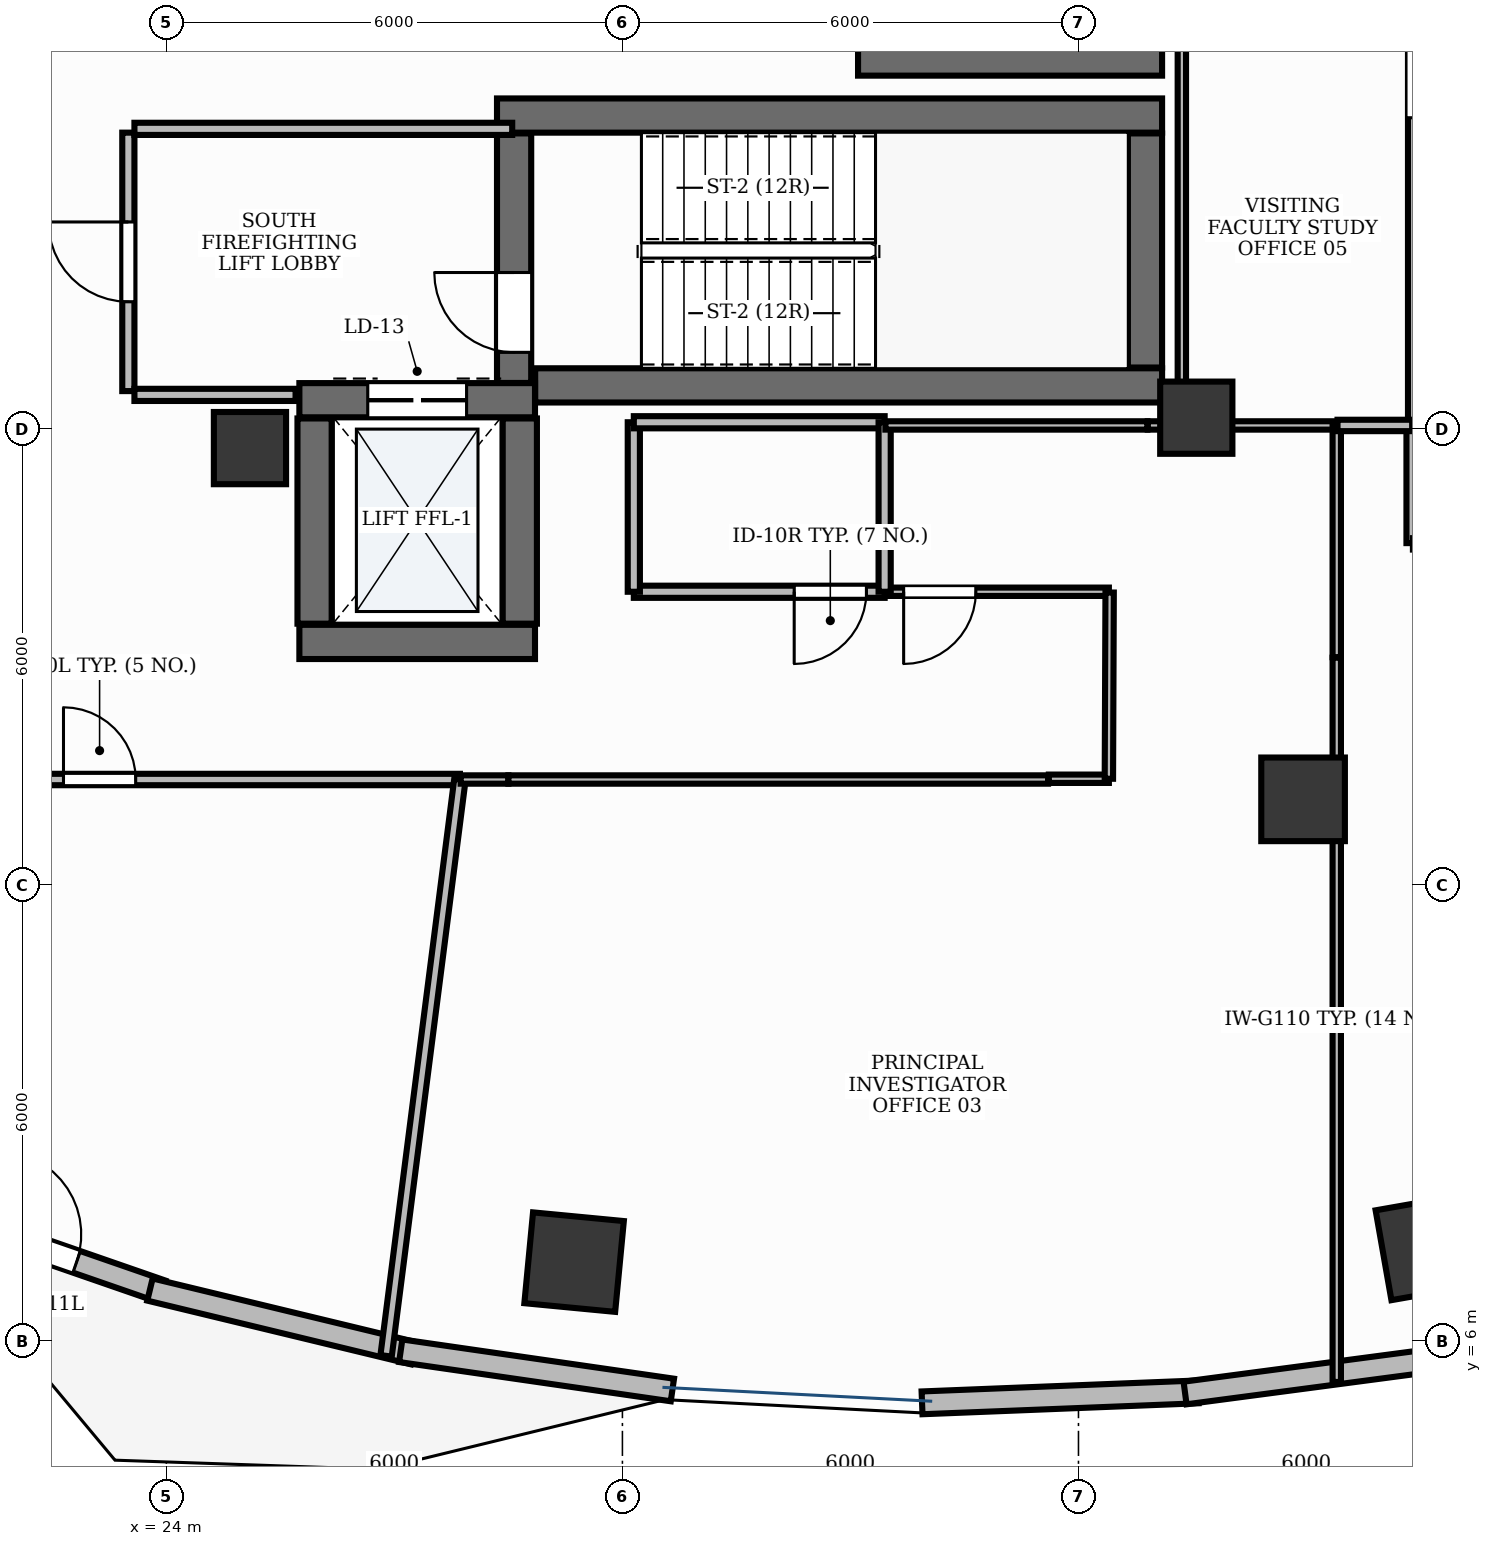
"""IFC4 building model, lengths in metres.
Left out: names, types, materials, properties, quantities, classifications, styles, units other than length and angle.
Written with IfcOpenShell. Run it as: python <this file> out.ifc"""

import sys

from ifc_helpers import new_model, si_unit, direction, frame, frame_2d, origin, origin_2d, place, context, subcontext, project, spatial, rectangle, extrude, element, fill, save


model = new_model("IFC4")
c1 = context("Model", 3, precision=1e-05, world=origin(), true_north=direction((0.0, 1.0)))
c2 = subcontext(c1, "Body", "Model", "MODEL_VIEW")
j1 = project(units=[si_unit("LENGTHUNIT", "METRE"), si_unit("PLANEANGLEUNIT", "RADIAN")], contexts=[c1])
p1 = place(None, origin())
s1 = spatial("IfcSite", under=j1, at=p1, CompositionType="ELEMENT")
p2 = place(p1, origin())
s2 = spatial("IfcBuilding", under=s1, at=p2, CompositionType="ELEMENT")
p3 = place(p2, frame((0.0, 0.0, 127.8)))
s3 = spatial("IfcBuildingStorey", under=s2, at=p3, CompositionType="ELEMENT", Elevation=127.8)
p4 = place(p3, frame((28.852, 18.575, 0.0), z_axis=(0.0, 0.0, 1.0), x_axis=(1.0, 0.0, 0.0)))
e1 = element("IfcWall", 1, at=p4, inside=s3, PredefinedType="SHEAR", context=c2, shape_type="SweptSolid", body=[
    extrude(rectangle(XDim=8.248, YDim=0.45, at=frame_2d((4.124, 0.0))), origin(), (0.0, 0.0, 1.0), 3.9),
])
p5 = place(p3, frame((28.35, 22.125, 0.0), z_axis=(0.0, 0.0, 1.0), x_axis=(1.0, 0.0, 0.0)))
e2 = element("IfcWall", 2, at=p5, inside=s3, PredefinedType="SHEAR", context=c2, shape_type="SweptSolid", body=[
    extrude(rectangle(XDim=8.75, YDim=0.45, at=frame_2d((4.375, 0.0))), origin(), (0.0, 0.0, 1.0), 3.9),
])
p6 = place(p3, frame((36.875, 18.81, 0.0), z_axis=(0.0, 0.0, 1.0), x_axis=(0.0, 1.0, 0.0)))
e3 = element("IfcWall", 3, at=p6, inside=s3, PredefinedType="SHEAR", context=c2, shape_type="SweptSolid", body=[
    extrude(rectangle(XDim=3.08, YDim=0.45, at=frame_2d((1.54, 0.0))), origin(), (0.0, 0.0, 1.0), 3.9),
])
p7 = place(p3, frame((28.575, 18.607, 0.0), z_axis=(0.0, 0.0, 1.0), x_axis=(0.0, 1.0, 0.0)))
e4 = element("IfcWall", 4, at=p7, inside=s3, PredefinedType="SHEAR", context=c2, shape_type="SweptSolid", body=[
    extrude(rectangle(XDim=3.283, YDim=0.45, at=frame_2d((1.642, 0.0))), origin(), (0.0, 0.0, 1.0), 3.9),
])
p8 = place(p7, frame((0.403, 0.0, 0.0)))
e5 = element("IfcOpeningElement", 5, at=p8, cuts=e4, PredefinedType="OPENING", context=c2, shape_type="SweptSolid", body=[
    extrude(rectangle(XDim=1.05, YDim=2.15, at=frame_2d((0.525, 1.075))), frame((0.0, 0.24, 0.0), z_axis=(0.0, -1.0, 0.0), x_axis=(1.0, 0.0, 0.0)), (0.0, 0.0, 1.0), 0.48),
])
p9 = place(p3, frame((33.1, 22.875, 0.0), z_axis=(0.0, 0.0, 1.0), x_axis=(1.0, 0.0, 0.0)))
e6 = element("IfcWall", 6, at=p9, inside=s3, PredefinedType="SHEAR", context=c2, shape_type="SweptSolid", body=[
    extrude(rectangle(XDim=4.0, YDim=0.45, at=frame_2d((2.0, 0.0))), origin(), (0.0, 0.0, 1.0), 3.9),
])
p10 = place(p3, frame((25.75, 15.2, 0.0), z_axis=(0.0, 0.0, 1.0), x_axis=(1.0, 0.0, 0.0)))
e7 = element("IfcWall", 7, at=p10, inside=s3, PredefinedType="SHEAR", context=c2, shape_type="SweptSolid", body=[
    extrude(rectangle(XDim=3.1, YDim=0.45, at=frame_2d((1.55, 0.0))), origin(), (0.0, 0.0, 1.0), 3.9),
])
p11 = place(p3, frame((25.75, 18.38, 0.0), z_axis=(0.0, 0.0, 1.0), x_axis=(1.0, 0.0, 0.0)))
e8 = element("IfcWall", 8, at=p11, inside=s3, PredefinedType="SHEAR", context=c2, shape_type="SweptSolid", body=[
    extrude(rectangle(XDim=3.1, YDim=0.45, at=frame_2d((1.55, 0.0))), origin(), (0.0, 0.0, 1.0), 3.9),
])
p12 = place(p11, frame((0.9, 0.0, 0.0)))
e9 = element("IfcOpeningElement", 9, at=p12, cuts=e8, PredefinedType="OPENING", context=c2, shape_type="SweptSolid", body=[
    extrude(rectangle(XDim=1.3, YDim=2.2, at=frame_2d((0.65, 1.1))), frame((0.0, 0.24, 0.0), z_axis=(0.0, -1.0, 0.0), x_axis=(1.0, 0.0, 0.0)), (0.0, 0.0, 1.0), 0.48),
])
for number, where, z_axis, x_axis in (
    (10, (25.95, 15.44, 0.0), (0.0, 0.0, 1.0), (0.0, 1.0, 0.0)),
    (11, (28.65, 15.44, 0.0), (0.0, 0.0, 1.0), (0.0, 1.0, 0.0)),
):
    element("IfcWall", number, at=place(p3, frame(where, z_axis=z_axis, x_axis=x_axis)), inside=s3, PredefinedType="SHEAR", context=c2, shape_type="SweptSolid", body=[
        extrude(rectangle(XDim=2.7, YDim=0.45, at=frame_2d((1.35, 0.0))), origin(), (0.0, 0.0, 1.0), 3.9),
    ])
for number, where, z_axis, x_axis in (
    (12, (25.1, 17.75, -0.0), (0.0, 0.0, 1.0), (1.0, 0.0, 0.0)),
    (13, (37.55, 18.15, -0.0), (0.0, 0.0, 1.0), (1.0, 0.0, 0.0)),
):
    element("IfcColumn", number, at=place(p3, frame(where, z_axis=z_axis, x_axis=x_axis)), inside=s3, PredefinedType="PILASTER", context=c2, shape_type="SweptSolid", body=[
        extrude(rectangle(XDim=0.95, YDim=0.95, at=origin_2d()), origin(), (0.0, 0.0, 1.0), 3.901),
    ])
for number, where, z_axis, x_axis in (
    (14, (29.364, 7.041, -0.0), (0.0, 0.0, 1.0), (-0.995, 0.095, 0.0)),
    (15, (40.604, 7.235, -0.0), (0.0, 0.0, 1.0), (0.985, 0.173, 0.0)),
):
    element("IfcColumn", number, at=place(p3, frame(where, z_axis=z_axis, x_axis=x_axis)), inside=s3, PredefinedType="COLUMN", context=c2, shape_type="SweptSolid", body=[
        extrude(rectangle(XDim=1.2, YDim=1.2, at=origin_2d()), origin(), (0.0, 0.0, 1.0), 3.901),
    ])
p13 = place(p3, frame((38.955, 13.129, -0.0), z_axis=(0.0, 0.0, 1.0), x_axis=(1.0, 0.0, 0.0)))
e16 = element("IfcColumn", 16, at=p13, inside=s3, PredefinedType="COLUMN", context=c2, shape_type="SweptSolid", body=[
    extrude(rectangle(XDim=1.1, YDim=1.1, at=origin_2d()), origin(), (0.0, 0.0, 1.0), 3.901),
])
p14 = place(p3, frame((20.662, 7.792, 0.0), z_axis=(0.0, 0.0, 1.0), x_axis=(0.944878029854, -0.3274225232, 0.0)))
e17 = element("IfcWall", 17, at=p14, inside=s3, PredefinedType="STANDARD", context=c2, shape_type="SweptSolid", body=[
    extrude(rectangle(XDim=3.467, YDim=0.3, at=frame_2d((1.734, 0.0))), origin(), (0.0, 0.0, 1.0), 3.9),
])
p15 = place(p14, frame((1.184, 0.0, 0.0)))
e18 = element("IfcOpeningElement", 18, at=p15, cuts=e17, PredefinedType="OPENING", context=c2, shape_type="SweptSolid", body=[
    extrude(rectangle(XDim=1.1, YDim=2.15, at=frame_2d((0.55, 1.075))), frame((0.0, 0.165, 0.0), z_axis=(0.0, -1.0, 0.0), x_axis=(1.0, 0.0, 0.0)), (0.0, 0.0, 1.0), 0.33),
])
p16 = place(p3, frame((23.784, 6.68, 0.0), z_axis=(0.0, 0.0, 1.0), x_axis=(0.972043452321, -0.234801036625, 0.0)))
e19 = element("IfcWall", 19, at=p16, inside=s3, PredefinedType="STANDARD", context=c2, shape_type="SweptSolid", body=[
    extrude(rectangle(XDim=3.569, YDim=0.3, at=frame_2d((1.784, 0.0))), origin(), (0.0, 0.0, 1.0), 3.9),
])
p17 = place(p3, frame((27.083, 5.875, 0.0), z_axis=(0.0, 0.0, 1.0), x_axis=(0.989734732902, -0.142916613754, 0.0)))
e20 = element("IfcWall", 20, at=p17, inside=s3, PredefinedType="STANDARD", context=c2, shape_type="SweptSolid", body=[
    extrude(rectangle(XDim=3.611, YDim=0.3, at=frame_2d((1.806, 0.0))), origin(), (0.0, 0.0, 1.0), 3.9),
])
p18 = place(p3, frame((33.942, 5.189, 0.0), z_axis=(0.0, 0.0, 1.0), x_axis=(0.999212076676, 0.039689114679, 0.0)))
e21 = element("IfcWall", 21, at=p18, inside=s3, PredefinedType="STANDARD", context=c2, shape_type="SweptSolid", body=[
    extrude(rectangle(XDim=3.635, YDim=0.3, at=frame_2d((1.818, 0.0))), origin(), (0.0, 0.0, 1.0), 3.9),
])
p19 = place(p3, frame((37.402, 5.319, 0.0), z_axis=(0.0, 0.0, 1.0), x_axis=(0.991372969521, 0.131071107816, 0.0)))
e22 = element("IfcWall", 22, at=p19, inside=s3, PredefinedType="STANDARD", context=c2, shape_type="SweptSolid", body=[
    extrude(rectangle(XDim=3.615, YDim=0.3, at=frame_2d((1.808, 0.0))), origin(), (0.0, 0.0, 1.0), 3.9),
])
p20 = place(p3, frame((23.5, 18.5, 0.0), z_axis=(0.0, 0.0, 1.0), x_axis=(0.0, 1.0, 0.0)))
e23 = element("IfcWall", 23, at=p20, inside=s3, PredefinedType="PARTITIONING", context=c2, shape_type="SweptSolid", body=[
    extrude(rectangle(XDim=3.4, YDim=0.16, at=frame_2d((1.7, 0.0))), origin(), (0.0, 0.0, 1.0), 2.91),
])
p21 = place(p20, frame((1.175, 0.0, 0.0)))
e24 = element("IfcOpeningElement", 24, at=p21, cuts=e23, PredefinedType="OPENING", context=c2, shape_type="SweptSolid", body=[
    extrude(rectangle(XDim=1.05, YDim=2.15, at=frame_2d((0.525, 1.075))), frame((0.0, 0.095, 0.0), z_axis=(0.0, -1.0, 0.0), x_axis=(1.0, 0.0, 0.0)), (0.0, 0.0, 1.0), 0.19),
])
p22 = place(p3, frame((23.58, 21.95, 0.0), z_axis=(0.0, 0.0, 1.0), x_axis=(1.0, 0.0, 0.0)))
e25 = element("IfcWall", 25, at=p22, inside=s3, PredefinedType="PARTITIONING", context=c2, shape_type="SweptSolid", body=[
    extrude(rectangle(XDim=4.97, YDim=0.16, at=frame_2d((2.485, 0.0))), origin(), (0.0, 0.0, 1.0), 2.91),
])
p23 = place(p3, frame((23.58, 18.45, 0.0), z_axis=(0.0, 0.0, 1.0), x_axis=(1.0, 0.0, 0.0)))
e26 = element("IfcWall", 26, at=p23, inside=s3, PredefinedType="PARTITIONING", context=c2, shape_type="SweptSolid", body=[
    extrude(rectangle(XDim=2.12, YDim=0.16, at=frame_2d((1.06, 0.0))), origin(), (0.0, 0.0, 1.0), 2.91),
])
p24 = place(p3, frame((33.45, 15.86, 0.0), z_axis=(0.0, 0.0, 1.0), x_axis=(-1.0, 0.0, 0.0)))
e27 = element("IfcWall", 27, at=p24, inside=s3, PredefinedType="PARTITIONING", context=c2, shape_type="SweptSolid", body=[
    extrude(rectangle(XDim=3.3, YDim=0.16, at=frame_2d((1.65, 0.0))), origin(), (0.0, 0.0, 1.0), 2.91),
])
p25 = place(p24, frame((0.24, 0.0, 0.0)))
e28 = element("IfcOpeningElement", 28, at=p25, cuts=e27, PredefinedType="OPENING", context=c2, shape_type="SweptSolid", body=[
    extrude(rectangle(XDim=0.95, YDim=2.15, at=frame_2d((0.475, 1.075))), frame((0.0, 0.095, 0.0), z_axis=(0.0, -1.0, 0.0), x_axis=(1.0, 0.0, 0.0)), (0.0, 0.0, 1.0), 0.19),
])
p26 = place(p3, frame((21.8, 13.39, 0.0), z_axis=(0.0, 0.0, 1.0), x_axis=(1.0, 0.0, 0.0)))
e29 = element("IfcWall", 29, at=p26, inside=s3, PredefinedType="PARTITIONING", context=c2, shape_type="SweptSolid", body=[
    extrude(rectangle(XDim=6.062, YDim=0.15, at=frame_2d((3.031, 0.0))), origin(), (0.0, 0.0, 1.0), 2.91),
])
p27 = place(p26, frame((0.847, 0.0, 0.0)))
e30 = element("IfcOpeningElement", 30, at=p27, cuts=e29, PredefinedType="OPENING", context=c2, shape_type="SweptSolid", body=[
    extrude(rectangle(XDim=0.95, YDim=2.15, at=frame_2d((0.475, 1.075))), frame((0.0, 0.09, 0.0), z_axis=(0.0, -1.0, 0.0), x_axis=(1.0, 0.0, 0.0)), (0.0, 0.0, 1.0), 0.18),
])
p28 = place(p3, frame((36.4, 15.86, 0.0), z_axis=(0.0, 0.0, 1.0), x_axis=(-1.0, 0.0, 0.0)))
e31 = element("IfcWall", 31, at=p28, inside=s3, PredefinedType="MOVABLE", context=c2, shape_type="SweptSolid", body=[
    extrude(rectangle(XDim=2.94, YDim=0.11, at=frame_2d((1.47, 0.0))), origin(), (0.0, 0.0, 1.0), 2.91),
])
p29 = place(p28, frame((1.75, 0.0, 0.0)))
e32 = element("IfcOpeningElement", 32, at=p29, cuts=e31, PredefinedType="OPENING", context=c2, shape_type="SweptSolid", body=[
    extrude(rectangle(XDim=0.95, YDim=2.15, at=frame_2d((0.475, 1.075))), frame((0.0, 0.07, 0.0), z_axis=(0.0, -1.0, 0.0), x_axis=(1.0, 0.0, 0.0)), (0.0, 0.0, 1.0), 0.14),
])
p30 = place(p3, frame((40.39, 23.285, 0.0), z_axis=(0.0, 0.0, 1.0), x_axis=(0.0, -1.0, 0.0)))
e33 = element("IfcWall", 33, at=p30, inside=s3, PredefinedType="MOVABLE", context=c2, shape_type="SweptSolid", body=[
    extrude(rectangle(XDim=5.227, YDim=0.11, at=frame_2d((2.614, 0.0))), origin(), (0.0, 0.0, 1.0), 2.91),
])
p31 = place(p30, frame((0.24, 0.0, 0.0)))
e34 = element("IfcOpeningElement", 34, at=p31, cuts=e33, PredefinedType="OPENING", context=c2, shape_type="SweptSolid", body=[
    extrude(rectangle(XDim=0.95, YDim=2.15, at=frame_2d((0.475, 1.075))), frame((0.0, 0.07, 0.0), z_axis=(0.0, -1.0, 0.0), x_axis=(1.0, 0.0, 0.0)), (0.0, 0.0, 1.0), 0.14),
])
p32 = place(p3, frame((30.15, 15.86, 0.0), z_axis=(0.0, 0.0, 1.0), x_axis=(0.0, 1.0, 0.0)))
e35 = element("IfcWall", 35, at=p32, inside=s3, PredefinedType="PARTITIONING", context=c2, shape_type="SweptSolid", body=[
    extrude(rectangle(XDim=2.23, YDim=0.16, at=frame_2d((1.115, 0.0))), origin(), (0.0, 0.0, 1.0), 2.91),
])
p33 = place(p3, frame((30.15, 18.09, 0.0), z_axis=(0.0, 0.0, 1.0), x_axis=(1.0, 0.0, 0.0)))
e36 = element("IfcWall", 36, at=p33, inside=s3, PredefinedType="PARTITIONING", context=c2, shape_type="SweptSolid", body=[
    extrude(rectangle(XDim=3.3, YDim=0.16, at=frame_2d((1.65, 0.0))), origin(), (0.0, 0.0, 1.0), 2.91),
])
p34 = place(p3, frame((33.45, 18.09, 0.0), z_axis=(0.0, 0.0, 1.0), x_axis=(0.0, -1.0, 0.0)))
e37 = element("IfcWall", 37, at=p34, inside=s3, PredefinedType="PARTITIONING", context=c2, shape_type="SweptSolid", body=[
    extrude(rectangle(XDim=2.23, YDim=0.16, at=frame_2d((1.115, 0.0))), origin(), (0.0, 0.0, 1.0), 2.91),
])
p35 = place(p3, frame((27.862, 13.39, 0.0), z_axis=(0.0, 0.0, 1.0), x_axis=(-0.127080525275, -0.991892403487, 0.0)))
e38 = element("IfcWall", 38, at=p35, inside=s3, PredefinedType="PARTITIONING", context=c2, shape_type="SweptSolid", body=[
    extrude(rectangle(XDim=7.644, YDim=0.15, at=frame_2d((3.822, 0.0))), origin(), (0.0, 0.0, 1.0), 2.91),
])
p36 = place(p3, frame((36.912, 18.048, 0.0), z_axis=(0.0, 0.0, 1.0), x_axis=(1.0, 0.0, 0.0)))
e39 = element("IfcWall", 39, at=p36, inside=s3, PredefinedType="MOVABLE", context=c2, shape_type="SweptSolid", body=[
    extrude(rectangle(XDim=2.486, YDim=0.11, at=frame_2d((1.243, 0.0))), origin(), (0.0, 0.0, 1.0), 2.91),
])
p37 = place(p3, frame((39.398, 18.048, 0.0), z_axis=(0.0, 0.0, 1.0), x_axis=(0.0, -1.0, 0.0)))
e40 = element("IfcWall", 40, at=p37, inside=s3, PredefinedType="MOVABLE", context=c2, shape_type="SweptSolid", body=[
    extrude(rectangle(XDim=3.049, YDim=0.11, at=frame_2d((1.524, 0.0))), origin(), (0.0, 0.0, 1.0), 2.91),
])
p38 = place(p3, frame((39.398, 14.993, 0.0), z_axis=(0.0, 0.0, 1.0), x_axis=(0.0, -1.0, 0.0)))
e41 = element("IfcWall", 41, at=p38, inside=s3, PredefinedType="MOVABLE", context=c2, shape_type="SweptSolid", body=[
    extrude(rectangle(XDim=9.529, YDim=0.11, at=frame_2d((4.764, 0.0))), origin(), (0.0, 0.0, 1.0), 2.91),
])
p39 = place(p3, frame((27.872, 13.39, 0.0), z_axis=(0.0, 0.0, 1.0), x_axis=(1.0, 0.0, 0.0)))
e42 = element("IfcWall", 42, at=p39, inside=s3, PredefinedType="MOVABLE", context=c2, shape_type="SweptSolid", body=[
    extrude(rectangle(XDim=0.628, YDim=0.11, at=frame_2d((0.314, 0.0))), origin(), (0.0, 0.0, 1.0), 2.91),
])
p40 = place(p3, frame((28.5, 13.39, 0.0), z_axis=(0.0, 0.0, 1.0), x_axis=(1.0, 0.0, 0.0)))
e43 = element("IfcWall", 43, at=p40, inside=s3, PredefinedType="MOVABLE", context=c2, shape_type="SweptSolid", body=[
    extrude(rectangle(XDim=7.1, YDim=0.11, at=frame_2d((3.55, 0.0))), origin(), (0.0, 0.0, 1.0), 2.91),
])
p41 = place(p3, frame((35.61, 13.4, 0.0), z_axis=(0.0, 0.0, 1.0), x_axis=(1.0, 0.0, 0.0)))
e44 = element("IfcWall", 44, at=p41, inside=s3, PredefinedType="MOVABLE", context=c2, shape_type="SweptSolid", body=[
    extrude(rectangle(XDim=0.79, YDim=0.11, at=frame_2d((0.395, 0.0))), origin(), (0.0, 0.0, 1.0), 2.91),
])
p42 = place(p3, frame((36.4, 13.4, 0.0), z_axis=(0.0, 0.0, 1.0), x_axis=(0.004085258855, 0.999991655295, 0.0)))
e45 = element("IfcWall", 45, at=p42, inside=s3, PredefinedType="MOVABLE", context=c2, shape_type="SweptSolid", body=[
    extrude(rectangle(XDim=2.45, YDim=0.11, at=frame_2d((1.225, 0.0))), origin(), (0.0, 0.0, 1.0), 2.91),
])
p43 = place(p3, frame((33.46, 18.048, 0.0), z_axis=(0.0, 0.0, 1.0), x_axis=(1.0, 0.0, 0.0)))
e46 = element("IfcWall", 46, at=p43, inside=s3, PredefinedType="MOVABLE", context=c2, shape_type="SweptSolid", body=[
    extrude(rectangle(XDim=3.446, YDim=0.11, at=frame_2d((1.723, 0.0))), origin(), (0.0, 0.0, 1.0), 2.91),
])
p44 = place(p3, frame((40.39, 18.048, 0.0), z_axis=(0.0, 0.0, 1.0), x_axis=(0.0, -1.0, 0.0)))
e47 = element("IfcWall", 47, at=p44, inside=s3, PredefinedType="PARTITIONING", context=c2, shape_type="SweptSolid", body=[
    extrude(rectangle(XDim=1.548, YDim=0.15, at=frame_2d((0.774, 0.0))), origin(), (0.0, 0.0, 1.0), 2.91),
])
p45 = place(p3, frame((39.408, 18.048, 0.0), z_axis=(0.0, 0.0, 1.0), x_axis=(1.0, 0.0, 0.0)))
e48 = element("IfcWall", 48, at=p45, inside=s3, PredefinedType="PARTITIONING", context=c2, shape_type="SweptSolid", body=[
    extrude(rectangle(XDim=0.982, YDim=0.15, at=frame_2d((0.491, 0.0))), origin(), (0.0, 0.0, 1.0), 2.91),
])
p46 = place(p3, frame((37.36, 18.1, 0.0), z_axis=(0.0, 0.0, 1.0), x_axis=(0.0, 1.0, 0.0)))
e49 = element("IfcWall", 49, at=p46, inside=s3, PredefinedType="MOVABLE", context=c2, shape_type="SweptSolid", body=[
    extrude(rectangle(XDim=7.29, YDim=0.11, at=frame_2d((3.645, 0.0))), origin(), (0.0, 0.0, 1.0), 2.91),
])
p47 = place(p15, origin())
e50 = element("IfcDoor", 50, at=p47, inside=s3, OperationType="SINGLE_SWING_LEFT", PredefinedType="DOOR", context=c2, shape_type="SweptSolid", body=[
    extrude(rectangle(XDim=1.1, YDim=2.15, at=frame_2d((0.55, 1.075))), frame((0.0, 0.025, 0.0), z_axis=(0.0, -1.0, 0.0), x_axis=(1.0, 0.0, 0.0)), (0.0, 0.0, 1.0), 0.05),
])
fill(e18, e50)
p48 = place(p8, origin())
e51 = element("IfcDoor", 51, at=p48, inside=s3, OperationType="SINGLE_SWING_RIGHT", PredefinedType="DOOR", context=c2, shape_type="SweptSolid", body=[
    extrude(rectangle(XDim=1.05, YDim=2.15, at=frame_2d((0.525, 1.075))), frame((0.0, 0.025, 0.0), z_axis=(0.0, -1.0, 0.0), x_axis=(1.0, 0.0, 0.0)), (0.0, 0.0, 1.0), 0.05),
])
fill(e5, e51)
p49 = place(p12, origin())
e52 = element("IfcDoor", 52, at=p49, inside=s3, OperationType="DOUBLE_DOOR_SLIDING", PredefinedType="DOOR", context=c2, shape_type="SweptSolid", body=[
    extrude(rectangle(XDim=1.3, YDim=2.2, at=frame_2d((0.65, 1.1))), frame((0.0, 0.025, 0.0), z_axis=(0.0, -1.0, 0.0), x_axis=(1.0, 0.0, 0.0)), (0.0, 0.0, 1.0), 0.05),
])
fill(e9, e52)
p50 = place(p21, origin())
e53 = element("IfcDoor", 53, at=p50, inside=s3, OperationType="SINGLE_SWING_RIGHT", PredefinedType="DOOR", context=c2, shape_type="SweptSolid", body=[
    extrude(rectangle(XDim=1.05, YDim=2.15, at=frame_2d((0.525, 1.075))), frame((0.0, 0.025, 0.0), z_axis=(0.0, -1.0, 0.0), x_axis=(1.0, 0.0, 0.0)), (0.0, 0.0, 1.0), 0.05),
])
fill(e24, e53)
p51 = place(p25, origin())
e54 = element("IfcDoor", 54, at=p51, inside=s3, OperationType="SINGLE_SWING_RIGHT", PredefinedType="DOOR", context=c2, shape_type="SweptSolid", body=[
    extrude(rectangle(XDim=0.95, YDim=2.15, at=frame_2d((0.475, 1.075))), frame((0.0, 0.025, 0.0), z_axis=(0.0, -1.0, 0.0), x_axis=(1.0, 0.0, 0.0)), (0.0, 0.0, 1.0), 0.05),
])
fill(e28, e54)
p52 = place(p27, origin())
e55 = element("IfcDoor", 55, at=p52, inside=s3, OperationType="SINGLE_SWING_LEFT", PredefinedType="DOOR", context=c2, shape_type="SweptSolid", body=[
    extrude(rectangle(XDim=0.95, YDim=2.15, at=frame_2d((0.475, 1.075))), frame((0.0, 0.025, 0.0), z_axis=(0.0, -1.0, 0.0), x_axis=(1.0, 0.0, 0.0)), (0.0, 0.0, 1.0), 0.05),
])
fill(e30, e55)
p53 = place(p29, origin())
e56 = element("IfcDoor", 56, at=p53, inside=s3, OperationType="SINGLE_SWING_RIGHT", PredefinedType="DOOR", context=c2, shape_type="SweptSolid", body=[
    extrude(rectangle(XDim=0.95, YDim=2.15, at=frame_2d((0.475, 1.075))), frame((0.0, 0.025, 0.0), z_axis=(0.0, -1.0, 0.0), x_axis=(1.0, 0.0, 0.0)), (0.0, 0.0, 1.0), 0.05),
])
fill(e32, e56)
p54 = place(p31, origin())
e57 = element("IfcDoor", 57, at=p54, inside=s3, OperationType="SINGLE_SWING_RIGHT", PredefinedType="DOOR", context=c2, shape_type="SweptSolid", body=[
    extrude(rectangle(XDim=0.95, YDim=2.15, at=frame_2d((0.475, 1.075))), frame((0.0, 0.025, 0.0), z_axis=(0.0, -1.0, 0.0), x_axis=(1.0, 0.0, 0.0)), (0.0, 0.0, 1.0), 0.05),
])
fill(e34, e57)
save(model, sys.argv[1])
